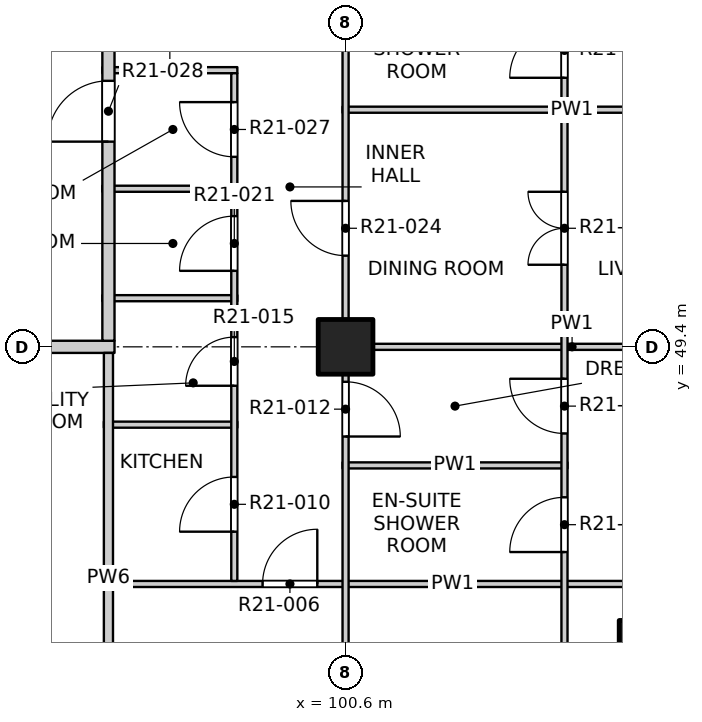
"""IFC4 building model, lengths in metres.
Left out: names, types, materials, properties, quantities, classifications, styles, units other than length and angle.
Written with IfcOpenShell. Run it as: python <this file> out.ifc"""

import sys

from ifc_helpers import new_model, si_unit, direction, frame, frame_2d, origin, origin_2d, place, context, subcontext, project, spatial, rectangle, extrude, element, fill, save


model = new_model("IFC4")
c1 = context("Model", 3, precision=1e-05, world=origin(), true_north=direction((0.0, 1.0)))
c2 = subcontext(c1, "Body", "Model", "MODEL_VIEW")
j1 = project(units=[si_unit("LENGTHUNIT", "METRE"), si_unit("PLANEANGLEUNIT", "RADIAN")], contexts=[c1])
p1 = place(None, origin())
s1 = spatial("IfcSite", under=j1, at=p1, CompositionType="ELEMENT")
p2 = place(p1, origin())
s2 = spatial("IfcBuilding", under=s1, at=p2, CompositionType="ELEMENT")
p3 = place(p2, frame((0.0, 0.0, 221.1)))
s3 = spatial("IfcBuildingStorey", under=s2, at=p3, CompositionType="ELEMENT", Elevation=221.1)
p4 = place(p3, frame((105.5, 44.5, -0.25), z_axis=(0.0, 0.0, 1.0), x_axis=(1.0, 0.0, 0.0)))
e1 = element("IfcColumn", 1, at=p4, inside=s3, PredefinedType="COLUMN", context=c2, shape_type="SweptSolid", body=[
    extrude(rectangle(XDim=0.8, YDim=0.8, at=origin_2d()), origin(), (0.0, 0.0, 1.0), 3.4),
])
p5 = place(p3, frame((100.6, 49.4, -0.25), z_axis=(0.0, 0.0, 1.0), x_axis=(1.0, 0.0, 0.0)))
e2 = element("IfcColumn", 2, at=p5, inside=s3, PredefinedType="COLUMN", context=c2, shape_type="SweptSolid", body=[
    extrude(rectangle(XDim=0.9, YDim=0.9, at=origin_2d()), origin(), (0.0, 0.0, 1.0), 3.4),
])
p6 = place(p3, frame((96.625, 45.5, 0.0), z_axis=(0.0, 0.0, 1.0), x_axis=(1.0, 0.0, 0.0)))
e3 = element("IfcWall", 3, at=p6, inside=s3, PredefinedType="PARTITIONING", context=c2, shape_type="SweptSolid", body=[
    extrude(rectangle(XDim=11.475, YDim=0.1, at=frame_2d((5.738, 0.0))), origin(), (0.0, 0.0, 1.0), 3.15),
])
p7 = place(p6, frame((2.61, 0.0, 0.0)))
e4 = element("IfcOpeningElement", 4, at=p7, cuts=e3, PredefinedType="OPENING", context=c2, shape_type="SweptSolid", body=[
    extrude(rectangle(XDim=0.9, YDim=2.1, at=frame_2d((0.45, 1.05))), frame((0.0, 0.06, 0.0), z_axis=(0.0, -1.0, 0.0), x_axis=(1.0, 0.0, 0.0)), (0.0, 0.0, 1.0), 0.12),
])
p8 = place(p3, frame((100.55, 47.45, 0.0), z_axis=(0.0, 0.0, 1.0), x_axis=(1.0, 0.0, 0.0)))
e5 = element("IfcWall", 5, at=p8, inside=s3, PredefinedType="PARTITIONING", context=c2, shape_type="SweptSolid", body=[
    extrude(rectangle(XDim=3.7, YDim=0.1, at=frame_2d((1.85, 0.0))), origin(), (0.0, 0.0, 1.0), 3.15),
])
p9 = place(p3, frame((96.625, 48.12, 0.0), z_axis=(0.0, 0.0, 1.0), x_axis=(1.0, 0.0, 0.0)))
e6 = element("IfcWall", 6, at=p9, inside=s3, PredefinedType="PARTITIONING", context=c2, shape_type="SweptSolid", body=[
    extrude(rectangle(XDim=2.195, YDim=0.1, at=frame_2d((1.098, 0.0))), origin(), (0.0, 0.0, 1.0), 3.15),
])
p10 = place(p3, frame((73.2, 49.4, 0.0), z_axis=(0.0, 0.0, 1.0), x_axis=(1.0, 0.0, 0.0)))
e7 = element("IfcWall", 7, at=p10, inside=s3, PredefinedType="PARTITIONING", context=c2, shape_type="SweptSolid", body=[
    extrude(rectangle(XDim=23.6, YDim=0.2, at=frame_2d((11.8, 0.0))), origin(), (0.0, 0.0, 1.0), 3.15),
])
p11 = place(p10, frame((1.6, 0.0, 0.0)))
e8 = element("IfcOpeningElement", 8, at=p11, cuts=e7, PredefinedType="OPENING", context=c2, shape_type="SweptSolid", body=[
    extrude(rectangle(XDim=0.9, YDim=2.1, at=frame_2d((0.45, 1.05))), frame((0.0, 0.11, 0.0), z_axis=(0.0, -1.0, 0.0), x_axis=(1.0, 0.0, 0.0)), (0.0, 0.0, 1.0), 0.22),
])
p12 = place(p10, frame((7.3, 0.0, 0.0)))
e9 = element("IfcOpeningElement", 9, at=p12, cuts=e7, PredefinedType="OPENING", context=c2, shape_type="SweptSolid", body=[
    extrude(rectangle(XDim=1.2, YDim=2.1, at=frame_2d((0.6, 1.05))), frame((0.0, 0.11, 0.0), z_axis=(0.0, -1.0, 0.0), x_axis=(1.0, 0.0, 0.0)), (0.0, 0.0, 1.0), 0.22),
])
p13 = place(p10, frame((13.3, 0.0, 0.0)))
e10 = element("IfcOpeningElement", 10, at=p13, cuts=e7, PredefinedType="OPENING", context=c2, shape_type="SweptSolid", body=[
    extrude(rectangle(XDim=0.9, YDim=2.1, at=frame_2d((0.45, 1.05))), frame((0.0, 0.11, 0.0), z_axis=(0.0, -1.0, 0.0), x_axis=(1.0, 0.0, 0.0)), (0.0, 0.0, 1.0), 0.22),
])
p14 = place(p10, frame((20.175, 0.0, 0.0)))
e11 = element("IfcOpeningElement", 11, at=p14, cuts=e7, PredefinedType="OPENING", context=c2, shape_type="SweptSolid", body=[
    extrude(rectangle(XDim=1.2, YDim=2.1, at=frame_2d((0.6, 1.05))), frame((0.0, 0.11, 0.0), z_axis=(0.0, -1.0, 0.0), x_axis=(1.0, 0.0, 0.0)), (0.0, 0.0, 1.0), 0.22),
])
p15 = place(p3, frame((100.55, 49.4, 0.0), z_axis=(0.0, 0.0, 1.0), x_axis=(1.0, 0.0, 0.0)))
e12 = element("IfcWall", 12, at=p15, inside=s3, PredefinedType="PARTITIONING", context=c2, shape_type="SweptSolid", body=[
    extrude(rectangle(XDim=7.55, YDim=0.1, at=frame_2d((3.775, 0.0))), origin(), (0.0, 0.0, 1.0), 3.15),
])
for number, where, z_axis, x_axis in (
    (13, (96.6, 50.2, 0.0), (0.0, 0.0, 1.0), (1.0, 0.0, 0.0)),
    (14, (96.6, 52.0, 0.0), (0.0, 0.0, 1.0), (1.0, 0.0, 0.0)),
):
    element("IfcWall", number, at=place(p3, frame(where, z_axis=z_axis, x_axis=x_axis)), inside=s3, PredefinedType="PARTITIONING", context=c2, shape_type="SweptSolid", body=[
        extrude(rectangle(XDim=2.22, YDim=0.1, at=frame_2d((1.11, 0.0))), origin(), (0.0, 0.0, 1.0), 3.15),
    ])
p16 = place(p3, frame((100.55, 53.3, 0.0), z_axis=(0.0, 0.0, 1.0), x_axis=(1.0, 0.0, 0.0)))
e15 = element("IfcWall", 15, at=p16, inside=s3, PredefinedType="PARTITIONING", context=c2, shape_type="SweptSolid", body=[
    extrude(rectangle(XDim=7.55, YDim=0.1, at=frame_2d((3.775, 0.0))), origin(), (0.0, 0.0, 1.0), 3.15),
])
p17 = place(p3, frame((96.6, 53.95, 0.0), z_axis=(0.0, 0.0, 1.0), x_axis=(1.0, 0.0, 0.0)))
e16 = element("IfcWall", 16, at=p17, inside=s3, PredefinedType="PARTITIONING", context=c2, shape_type="SweptSolid", body=[
    extrude(rectangle(XDim=2.22, YDim=0.1, at=frame_2d((1.11, 0.0))), origin(), (0.0, 0.0, 1.0), 3.15),
])
p18 = place(p3, frame((96.7, 41.9, 0.0), z_axis=(0.0, 0.0, 1.0), x_axis=(0.0, 1.0, 0.0)))
e17 = element("IfcWall", 17, at=p18, inside=s3, PredefinedType="PARTITIONING", context=c2, shape_type="SweptSolid", body=[
    extrude(rectangle(XDim=7.4, YDim=0.15, at=frame_2d((3.7, 0.0))), origin(), (0.0, 0.0, 1.0), 3.15),
])
p19 = place(p3, frame((96.7, 49.5, 0.0), z_axis=(0.0, 0.0, 1.0), x_axis=(0.0, 1.0, 0.0)))
e18 = element("IfcWall", 18, at=p19, inside=s3, PredefinedType="PARTITIONING", context=c2, shape_type="SweptSolid", body=[
    extrude(rectangle(XDim=34.9, YDim=0.2, at=frame_2d((17.45, 0.0))), origin(), (0.0, 0.0, 1.0), 3.15),
])
p20 = place(p19, frame((3.275, 0.0, 0.0)))
e19 = element("IfcOpeningElement", 19, at=p20, cuts=e18, PredefinedType="OPENING", context=c2, shape_type="SweptSolid", body=[
    extrude(rectangle(XDim=1.0, YDim=2.1, at=frame_2d((0.5, 1.05))), frame((0.0, 0.11, 0.0), z_axis=(0.0, -1.0, 0.0), x_axis=(1.0, 0.0, 0.0)), (0.0, 0.0, 1.0), 0.22),
])
p21 = place(p19, frame((10.825, 0.0, 0.0)))
e20 = element("IfcOpeningElement", 20, at=p21, cuts=e18, PredefinedType="OPENING", context=c2, shape_type="SweptSolid", body=[
    extrude(rectangle(XDim=1.0, YDim=2.1, at=frame_2d((0.5, 1.05))), frame((0.0, 0.11, 0.0), z_axis=(0.0, -1.0, 0.0), x_axis=(1.0, 0.0, 0.0)), (0.0, 0.0, 1.0), 0.22),
])
p22 = place(p19, frame((21.575, 0.0, 0.0)))
e21 = element("IfcOpeningElement", 21, at=p22, cuts=e18, PredefinedType="OPENING", context=c2, shape_type="SweptSolid", body=[
    extrude(rectangle(XDim=1.0, YDim=2.1, at=frame_2d((0.5, 1.05))), frame((0.0, 0.11, 0.0), z_axis=(0.0, -1.0, 0.0), x_axis=(1.0, 0.0, 0.0)), (0.0, 0.0, 1.0), 0.22),
])
p23 = place(p19, frame((30.575, 0.0, 0.0)))
e22 = element("IfcOpeningElement", 22, at=p23, cuts=e18, PredefinedType="OPENING", context=c2, shape_type="SweptSolid", body=[
    extrude(rectangle(XDim=1.0, YDim=2.1, at=frame_2d((0.5, 1.05))), frame((0.0, 0.11, 0.0), z_axis=(0.0, -1.0, 0.0), x_axis=(1.0, 0.0, 0.0)), (0.0, 0.0, 1.0), 0.22),
])
p24 = place(p3, frame((98.77, 45.55, 0.0), z_axis=(0.0, 0.0, 1.0), x_axis=(0.0, 1.0, 0.0)))
e23 = element("IfcWall", 23, at=p24, inside=s3, PredefinedType="PARTITIONING", context=c2, shape_type="SweptSolid", body=[
    extrude(rectangle(XDim=8.35, YDim=0.1, at=frame_2d((4.175, 0.0))), origin(), (0.0, 0.0, 1.0), 3.15),
])
p25 = place(p24, frame((0.81, 0.0, 0.0)))
e24 = element("IfcOpeningElement", 24, at=p25, cuts=e23, PredefinedType="OPENING", context=c2, shape_type="SweptSolid", body=[
    extrude(rectangle(XDim=0.9, YDim=2.1, at=frame_2d((0.45, 1.05))), frame((0.0, 0.06, 0.0), z_axis=(0.0, -1.0, 0.0), x_axis=(1.0, 0.0, 0.0)), (0.0, 0.0, 1.0), 0.12),
])
p26 = place(p24, frame((3.21, 0.0, 0.0)))
e25 = element("IfcOpeningElement", 25, at=p26, cuts=e23, PredefinedType="OPENING", context=c2, shape_type="SweptSolid", body=[
    extrude(rectangle(XDim=0.8, YDim=2.1, at=frame_2d((0.4, 1.05))), frame((0.0, 0.06, 0.0), z_axis=(0.0, -1.0, 0.0), x_axis=(1.0, 0.0, 0.0)), (0.0, 0.0, 1.0), 0.12),
])
p27 = place(p24, frame((5.1, 0.0, 0.0)))
e26 = element("IfcOpeningElement", 26, at=p27, cuts=e23, PredefinedType="OPENING", context=c2, shape_type="SweptSolid", body=[
    extrude(rectangle(XDim=0.9, YDim=2.1, at=frame_2d((0.45, 1.05))), frame((0.0, 0.06, 0.0), z_axis=(0.0, -1.0, 0.0), x_axis=(1.0, 0.0, 0.0)), (0.0, 0.0, 1.0), 0.12),
])
p28 = place(p24, frame((6.975, 0.0, 0.0)))
e27 = element("IfcOpeningElement", 27, at=p28, cuts=e23, PredefinedType="OPENING", context=c2, shape_type="SweptSolid", body=[
    extrude(rectangle(XDim=0.9, YDim=2.1, at=frame_2d((0.45, 1.05))), frame((0.0, 0.06, 0.0), z_axis=(0.0, -1.0, 0.0), x_axis=(1.0, 0.0, 0.0)), (0.0, 0.0, 1.0), 0.12),
])
p29 = place(p3, frame((100.6, 41.9, 0.0), z_axis=(0.0, 0.0, 1.0), x_axis=(0.0, 1.0, 0.0)))
e28 = element("IfcWall", 28, at=p29, inside=s3, PredefinedType="PARTITIONING", context=c2, shape_type="SweptSolid", body=[
    extrude(rectangle(XDim=46.2, YDim=0.1, at=frame_2d((23.1, 0.0))), origin(), (0.0, 0.0, 1.0), 3.15),
])
p30 = place(p29, frame((1.2, 0.0, 0.0)))
e29 = element("IfcOpeningElement", 29, at=p30, cuts=e28, PredefinedType="OPENING", context=c2, shape_type="SweptSolid", body=[
    extrude(rectangle(XDim=0.9, YDim=2.1, at=frame_2d((0.45, 1.05))), frame((0.0, 0.06, 0.0), z_axis=(0.0, -1.0, 0.0), x_axis=(1.0, 0.0, 0.0)), (0.0, 0.0, 1.0), 0.12),
])
p31 = place(p29, frame((6.025, 0.0, 0.0)))
e30 = element("IfcOpeningElement", 30, at=p31, cuts=e28, PredefinedType="OPENING", context=c2, shape_type="SweptSolid", body=[
    extrude(rectangle(XDim=0.9, YDim=2.1, at=frame_2d((0.45, 1.05))), frame((0.0, 0.06, 0.0), z_axis=(0.0, -1.0, 0.0), x_axis=(1.0, 0.0, 0.0)), (0.0, 0.0, 1.0), 0.12),
])
p32 = place(p29, frame((9.0, 0.0, 0.0)))
e31 = element("IfcOpeningElement", 31, at=p32, cuts=e28, PredefinedType="OPENING", context=c2, shape_type="SweptSolid", body=[
    extrude(rectangle(XDim=0.9, YDim=2.1, at=frame_2d((0.45, 1.05))), frame((0.0, 0.06, 0.0), z_axis=(0.0, -1.0, 0.0), x_axis=(1.0, 0.0, 0.0)), (0.0, 0.0, 1.0), 0.12),
])
p33 = place(p29, frame((13.85, 0.0, 0.0)))
e32 = element("IfcOpeningElement", 32, at=p33, cuts=e28, PredefinedType="OPENING", context=c2, shape_type="SweptSolid", body=[
    extrude(rectangle(XDim=0.9, YDim=2.1, at=frame_2d((0.45, 1.05))), frame((0.0, 0.06, 0.0), z_axis=(0.0, -1.0, 0.0), x_axis=(1.0, 0.0, 0.0)), (0.0, 0.0, 1.0), 0.12),
])
p34 = place(p29, frame((16.8, 0.0, 0.0)))
e33 = element("IfcOpeningElement", 33, at=p34, cuts=e28, PredefinedType="OPENING", context=c2, shape_type="SweptSolid", body=[
    extrude(rectangle(XDim=0.9, YDim=2.1, at=frame_2d((0.45, 1.05))), frame((0.0, 0.06, 0.0), z_axis=(0.0, -1.0, 0.0), x_axis=(1.0, 0.0, 0.0)), (0.0, 0.0, 1.0), 0.12),
])
p35 = place(p29, frame((21.625, 0.0, 0.0)))
e34 = element("IfcOpeningElement", 34, at=p35, cuts=e28, PredefinedType="OPENING", context=c2, shape_type="SweptSolid", body=[
    extrude(rectangle(XDim=0.9, YDim=2.1, at=frame_2d((0.45, 1.05))), frame((0.0, 0.06, 0.0), z_axis=(0.0, -1.0, 0.0), x_axis=(1.0, 0.0, 0.0)), (0.0, 0.0, 1.0), 0.12),
])
p36 = place(p29, frame((24.6, 0.0, 0.0)))
e35 = element("IfcOpeningElement", 35, at=p36, cuts=e28, PredefinedType="OPENING", context=c2, shape_type="SweptSolid", body=[
    extrude(rectangle(XDim=0.9, YDim=2.1, at=frame_2d((0.45, 1.05))), frame((0.0, 0.06, 0.0), z_axis=(0.0, -1.0, 0.0), x_axis=(1.0, 0.0, 0.0)), (0.0, 0.0, 1.0), 0.12),
])
p37 = place(p29, frame((29.425, 0.0, 0.0)))
e36 = element("IfcOpeningElement", 36, at=p37, cuts=e28, PredefinedType="OPENING", context=c2, shape_type="SweptSolid", body=[
    extrude(rectangle(XDim=0.9, YDim=2.1, at=frame_2d((0.45, 1.05))), frame((0.0, 0.06, 0.0), z_axis=(0.0, -1.0, 0.0), x_axis=(1.0, 0.0, 0.0)), (0.0, 0.0, 1.0), 0.12),
])
p38 = place(p29, frame((33.375, 0.0, 0.0)))
e37 = element("IfcOpeningElement", 37, at=p38, cuts=e28, PredefinedType="OPENING", context=c2, shape_type="SweptSolid", body=[
    extrude(rectangle(XDim=0.9, YDim=2.1, at=frame_2d((0.45, 1.05))), frame((0.0, 0.06, 0.0), z_axis=(0.0, -1.0, 0.0), x_axis=(1.0, 0.0, 0.0)), (0.0, 0.0, 1.0), 0.12),
])
p39 = place(p29, frame((36.3, 0.0, 0.0)))
e38 = element("IfcOpeningElement", 38, at=p39, cuts=e28, PredefinedType="OPENING", context=c2, shape_type="SweptSolid", body=[
    extrude(rectangle(XDim=0.9, YDim=2.1, at=frame_2d((0.45, 1.05))), frame((0.0, 0.06, 0.0), z_axis=(0.0, -1.0, 0.0), x_axis=(1.0, 0.0, 0.0)), (0.0, 0.0, 1.0), 0.12),
])
p40 = place(p29, frame((41.175, 0.0, 0.0)))
e39 = element("IfcOpeningElement", 39, at=p40, cuts=e28, PredefinedType="OPENING", context=c2, shape_type="SweptSolid", body=[
    extrude(rectangle(XDim=0.9, YDim=2.1, at=frame_2d((0.45, 1.05))), frame((0.0, 0.06, 0.0), z_axis=(0.0, -1.0, 0.0), x_axis=(1.0, 0.0, 0.0)), (0.0, 0.0, 1.0), 0.12),
])
p41 = place(p29, frame((44.1, 0.0, 0.0)))
e40 = element("IfcOpeningElement", 40, at=p41, cuts=e28, PredefinedType="OPENING", context=c2, shape_type="SweptSolid", body=[
    extrude(rectangle(XDim=0.9, YDim=2.1, at=frame_2d((0.45, 1.05))), frame((0.0, 0.06, 0.0), z_axis=(0.0, -1.0, 0.0), x_axis=(1.0, 0.0, 0.0)), (0.0, 0.0, 1.0), 0.12),
])
p42 = place(p3, frame((104.2, 41.9, 0.0), z_axis=(0.0, 0.0, 1.0), x_axis=(0.0, 1.0, 0.0)))
e41 = element("IfcWall", 41, at=p42, inside=s3, PredefinedType="PARTITIONING", context=c2, shape_type="SweptSolid", body=[
    extrude(rectangle(XDim=23.0, YDim=0.1, at=frame_2d((11.5, 0.0))), origin(), (0.0, 0.0, 1.0), 3.15),
])
p43 = place(p42, frame((1.05, 0.0, 0.0)))
e42 = element("IfcOpeningElement", 42, at=p43, cuts=e41, PredefinedType="OPENING", context=c2, shape_type="SweptSolid", body=[
    extrude(rectangle(XDim=1.2, YDim=2.1, at=frame_2d((0.6, 1.05))), frame((0.0, 0.06, 0.0), z_axis=(0.0, -1.0, 0.0), x_axis=(1.0, 0.0, 0.0)), (0.0, 0.0, 1.0), 0.12),
])
p44 = place(p42, frame((4.125, 0.0, 0.0)))
e43 = element("IfcOpeningElement", 43, at=p44, cuts=e41, PredefinedType="OPENING", context=c2, shape_type="SweptSolid", body=[
    extrude(rectangle(XDim=0.9, YDim=2.1, at=frame_2d((0.45, 1.05))), frame((0.0, 0.06, 0.0), z_axis=(0.0, -1.0, 0.0), x_axis=(1.0, 0.0, 0.0)), (0.0, 0.0, 1.0), 0.12),
])
p45 = place(p42, frame((6.075, 0.0, 0.0)))
e44 = element("IfcOpeningElement", 44, at=p45, cuts=e41, PredefinedType="OPENING", context=c2, shape_type="SweptSolid", body=[
    extrude(rectangle(XDim=0.9, YDim=2.1, at=frame_2d((0.45, 1.05))), frame((0.0, 0.06, 0.0), z_axis=(0.0, -1.0, 0.0), x_axis=(1.0, 0.0, 0.0)), (0.0, 0.0, 1.0), 0.12),
])
p46 = place(p42, frame((8.85, 0.0, 0.0)))
e45 = element("IfcOpeningElement", 45, at=p46, cuts=e41, PredefinedType="OPENING", context=c2, shape_type="SweptSolid", body=[
    extrude(rectangle(XDim=1.2, YDim=2.1, at=frame_2d((0.6, 1.05))), frame((0.0, 0.06, 0.0), z_axis=(0.0, -1.0, 0.0), x_axis=(1.0, 0.0, 0.0)), (0.0, 0.0, 1.0), 0.12),
])
p47 = place(p42, frame((11.925, 0.0, 0.0)))
e46 = element("IfcOpeningElement", 46, at=p47, cuts=e41, PredefinedType="OPENING", context=c2, shape_type="SweptSolid", body=[
    extrude(rectangle(XDim=0.9, YDim=2.1, at=frame_2d((0.45, 1.05))), frame((0.0, 0.06, 0.0), z_axis=(0.0, -1.0, 0.0), x_axis=(1.0, 0.0, 0.0)), (0.0, 0.0, 1.0), 0.12),
])
p48 = place(p42, frame((13.875, 0.0, 0.0)))
e47 = element("IfcOpeningElement", 47, at=p48, cuts=e41, PredefinedType="OPENING", context=c2, shape_type="SweptSolid", body=[
    extrude(rectangle(XDim=0.9, YDim=2.1, at=frame_2d((0.45, 1.05))), frame((0.0, 0.06, 0.0), z_axis=(0.0, -1.0, 0.0), x_axis=(1.0, 0.0, 0.0)), (0.0, 0.0, 1.0), 0.12),
])
p49 = place(p42, frame((16.65, 0.0, 0.0)))
e48 = element("IfcOpeningElement", 48, at=p49, cuts=e41, PredefinedType="OPENING", context=c2, shape_type="SweptSolid", body=[
    extrude(rectangle(XDim=1.2, YDim=2.1, at=frame_2d((0.6, 1.05))), frame((0.0, 0.06, 0.0), z_axis=(0.0, -1.0, 0.0), x_axis=(1.0, 0.0, 0.0)), (0.0, 0.0, 1.0), 0.12),
])
p50 = place(p42, frame((19.725, 0.0, 0.0)))
e49 = element("IfcOpeningElement", 49, at=p50, cuts=e41, PredefinedType="OPENING", context=c2, shape_type="SweptSolid", body=[
    extrude(rectangle(XDim=0.9, YDim=2.1, at=frame_2d((0.45, 1.05))), frame((0.0, 0.06, 0.0), z_axis=(0.0, -1.0, 0.0), x_axis=(1.0, 0.0, 0.0)), (0.0, 0.0, 1.0), 0.12),
])
p51 = place(p42, frame((21.675, 0.0, 0.0)))
e50 = element("IfcOpeningElement", 50, at=p51, cuts=e41, PredefinedType="OPENING", context=c2, shape_type="SweptSolid", body=[
    extrude(rectangle(XDim=0.9, YDim=2.1, at=frame_2d((0.45, 1.05))), frame((0.0, 0.06, 0.0), z_axis=(0.0, -1.0, 0.0), x_axis=(1.0, 0.0, 0.0)), (0.0, 0.0, 1.0), 0.12),
])
p52 = place(p7, origin())
e51 = element("IfcDoor", 51, at=p52, inside=s3, OperationType="SINGLE_SWING_RIGHT", PredefinedType="DOOR", context=c2, shape_type="SweptSolid", body=[
    extrude(rectangle(XDim=0.9, YDim=2.1, at=frame_2d((0.45, 1.05))), frame((0.0, 0.025, 0.0), z_axis=(0.0, -1.0, 0.0), x_axis=(1.0, 0.0, 0.0)), (0.0, 0.0, 1.0), 0.05),
])
fill(e4, e51)
p53 = place(p44, origin())
e52 = element("IfcDoor", 52, at=p53, inside=s3, OperationType="SINGLE_SWING_LEFT", PredefinedType="DOOR", context=c2, shape_type="SweptSolid", body=[
    extrude(rectangle(XDim=0.9, YDim=2.1, at=frame_2d((0.45, 1.05))), frame((0.0, 0.025, 0.0), z_axis=(0.0, -1.0, 0.0), x_axis=(1.0, 0.0, 0.0)), (0.0, 0.0, 1.0), 0.05),
])
fill(e43, e52)
p54 = place(p25, origin())
e53 = element("IfcDoor", 53, at=p54, inside=s3, OperationType="SINGLE_SWING_LEFT", PredefinedType="DOOR", context=c2, shape_type="SweptSolid", body=[
    extrude(rectangle(XDim=0.9, YDim=2.1, at=frame_2d((0.45, 1.05))), frame((0.0, 0.025, 0.0), z_axis=(0.0, -1.0, 0.0), x_axis=(1.0, 0.0, 0.0)), (0.0, 0.0, 1.0), 0.05),
])
fill(e24, e53)
p55 = place(p31, origin())
e54 = element("IfcDoor", 54, at=p55, inside=s3, OperationType="SINGLE_SWING_RIGHT", PredefinedType="DOOR", context=c2, shape_type="SweptSolid", body=[
    extrude(rectangle(XDim=0.9, YDim=2.1, at=frame_2d((0.45, 1.05))), frame((0.0, 0.025, 0.0), z_axis=(0.0, -1.0, 0.0), x_axis=(1.0, 0.0, 0.0)), (0.0, 0.0, 1.0), 0.05),
])
fill(e30, e54)
p56 = place(p45, origin())
e55 = element("IfcDoor", 55, at=p56, inside=s3, OperationType="SINGLE_SWING_RIGHT", PredefinedType="DOOR", context=c2, shape_type="SweptSolid", body=[
    extrude(rectangle(XDim=0.9, YDim=2.1, at=frame_2d((0.45, 1.05))), frame((0.0, 0.025, 0.0), z_axis=(0.0, -1.0, 0.0), x_axis=(1.0, 0.0, 0.0)), (0.0, 0.0, 1.0), 0.05),
])
fill(e44, e55)
p57 = place(p26, origin())
e56 = element("IfcDoor", 56, at=p57, inside=s3, OperationType="SINGLE_SWING_LEFT", PredefinedType="DOOR", context=c2, shape_type="SweptSolid", body=[
    extrude(rectangle(XDim=0.8, YDim=2.1, at=frame_2d((0.4, 1.05))), frame((0.0, 0.025, 0.0), z_axis=(0.0, -1.0, 0.0), x_axis=(1.0, 0.0, 0.0)), (0.0, 0.0, 1.0), 0.05),
])
fill(e25, e56)
p58 = place(p27, origin())
e57 = element("IfcDoor", 57, at=p58, inside=s3, OperationType="SINGLE_SWING_LEFT", PredefinedType="DOOR", context=c2, shape_type="SweptSolid", body=[
    extrude(rectangle(XDim=0.9, YDim=2.1, at=frame_2d((0.45, 1.05))), frame((0.0, 0.025, 0.0), z_axis=(0.0, -1.0, 0.0), x_axis=(1.0, 0.0, 0.0)), (0.0, 0.0, 1.0), 0.05),
])
fill(e26, e57)
p59 = place(p32, origin())
e58 = element("IfcDoor", 58, at=p59, inside=s3, OperationType="SINGLE_SWING_RIGHT", PredefinedType="DOOR", context=c2, shape_type="SweptSolid", body=[
    extrude(rectangle(XDim=0.9, YDim=2.1, at=frame_2d((0.45, 1.05))), frame((0.0, 0.025, 0.0), z_axis=(0.0, -1.0, 0.0), x_axis=(1.0, 0.0, 0.0)), (0.0, 0.0, 1.0), 0.05),
])
fill(e31, e58)
p60 = place(p46, origin())
e59 = element("IfcDoor", 59, at=p60, inside=s3, OperationType="DOUBLE_DOOR_SINGLE_SWING", PredefinedType="DOOR", context=c2, shape_type="SweptSolid", body=[
    extrude(rectangle(XDim=1.2, YDim=2.1, at=frame_2d((0.6, 1.05))), frame((0.0, 0.025, 0.0), z_axis=(0.0, -1.0, 0.0), x_axis=(1.0, 0.0, 0.0)), (0.0, 0.0, 1.0), 0.05),
])
fill(e45, e59)
p61 = place(p28, origin())
e60 = element("IfcDoor", 60, at=p61, inside=s3, OperationType="SINGLE_SWING_RIGHT", PredefinedType="DOOR", context=c2, shape_type="SweptSolid", body=[
    extrude(rectangle(XDim=0.9, YDim=2.1, at=frame_2d((0.45, 1.05))), frame((0.0, 0.025, 0.0), z_axis=(0.0, -1.0, 0.0), x_axis=(1.0, 0.0, 0.0)), (0.0, 0.0, 1.0), 0.05),
])
fill(e27, e60)
p62 = place(p20, origin())
e61 = element("IfcDoor", 61, at=p62, inside=s3, OperationType="SINGLE_SWING_RIGHT", PredefinedType="DOOR", context=c2, shape_type="SweptSolid", body=[
    extrude(rectangle(XDim=1.0, YDim=2.1, at=frame_2d((0.5, 1.05))), frame((0.0, 0.025, 0.0), z_axis=(0.0, -1.0, 0.0), x_axis=(1.0, 0.0, 0.0)), (0.0, 0.0, 1.0), 0.05),
])
fill(e19, e61)
p63 = place(p47, origin())
e62 = element("IfcDoor", 62, at=p63, inside=s3, OperationType="SINGLE_SWING_LEFT", PredefinedType="DOOR", context=c2, shape_type="SweptSolid", body=[
    extrude(rectangle(XDim=0.9, YDim=2.1, at=frame_2d((0.45, 1.05))), frame((0.0, 0.025, 0.0), z_axis=(0.0, -1.0, 0.0), x_axis=(1.0, 0.0, 0.0)), (0.0, 0.0, 1.0), 0.05),
])
fill(e46, e62)
save(model, sys.argv[1])
